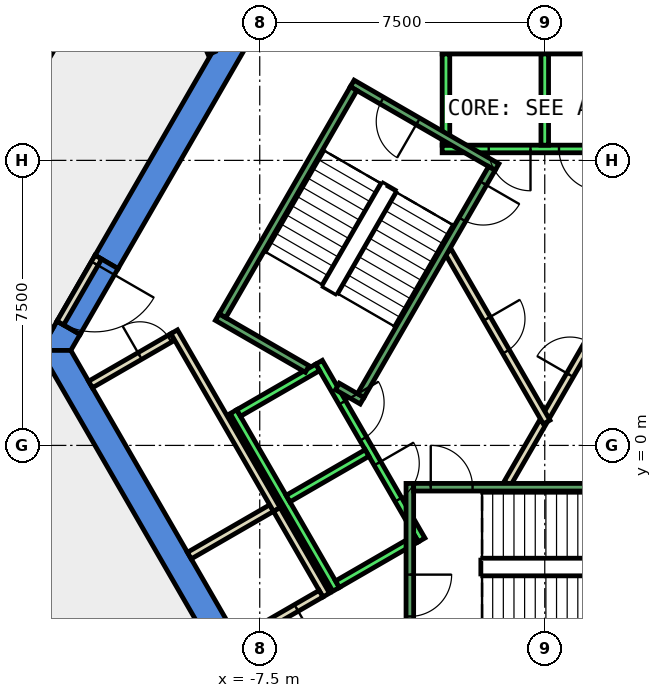
"""IFC4 building model, lengths in metres.
Left out: names, types, materials, properties, quantities, classifications, styles, units other than length and angle.
Written with IfcOpenShell. Run it as: python <this file> out.ifc"""

import sys

from ifc_helpers import new_model, si_unit, direction, frame, frame_2d, origin, place, context, subcontext, project, spatial, polyline, rectangle, outline, extrude, element, fill, save


model = new_model("IFC4")
c1 = context("Model", 3, precision=1e-05, world=origin(), true_north=direction((0.0, 1.0)))
c2 = subcontext(c1, "Body", "Model", "MODEL_VIEW")
j1 = project(units=[si_unit("LENGTHUNIT", "METRE"), si_unit("PLANEANGLEUNIT", "RADIAN")], contexts=[c1])
p1 = place(None, origin())
s1 = spatial("IfcSite", under=j1, at=p1, CompositionType="ELEMENT")
p2 = place(p1, origin())
s2 = spatial("IfcBuilding", under=s1, at=p2, CompositionType="ELEMENT")
p3 = place(p2, frame((0.0, 0.0, 215.0)))
s3 = spatial("IfcBuildingStorey", under=s2, at=p3, CompositionType="ELEMENT", Elevation=215.0)
p4 = place(p3, frame((0.0, 0.0, -0.4)))
e1 = element("IfcWall", 1, at=p4, inside=s3, PredefinedType="SHEAR", context=c2, shape_type="SweptSolid", body=[
    extrude(outline(polyline([(-11.834, 5.002), (-11.228, 4.652), (-6.235, 13.3), (-6.64, 14.0), (-11.834, 5.002)])), origin(), (0.0, 0.0, 1.0), 4.2),
])
p5 = place(p3, frame((0.0, 0.0, -0.4)))
e2 = element("IfcWall", 2, at=p5, inside=s3, PredefinedType="SHEAR", context=c2, shape_type="SweptSolid", body=[
    extrude(outline(polyline([(-12.228, 2.92), (-12.834, 3.27), (-13.279, 2.5), (-12.471, 2.5), (-12.228, 2.92)])), origin(), (0.0, 0.0, 1.0), 4.2),
])
p6 = place(p3, frame((0.0, 0.0, 3.6)))
e3 = element("IfcWall", 3, at=p6, inside=s3, PredefinedType="SHEAR", context=c2, shape_type="SweptSolid", body=[
    extrude(outline(polyline([(-12.834, 3.27), (-12.228, 2.92), (-11.228, 4.652), (-11.834, 5.002), (-12.834, 3.27)])), origin(), (0.0, 0.0, 1.0), 0.2),
])
p7 = place(p3, frame((0.0, 0.0, -0.4)))
e4 = element("IfcWall", 4, at=p7, inside=s3, PredefinedType="SHEAR", context=c2, shape_type="SweptSolid", body=[
    extrude(outline(polyline([(-13.279, 2.5), (-6.64, -9.0), (-6.235, -8.3), (-12.471, 2.5), (-13.279, 2.5)])), origin(), (0.0, 0.0, 1.0), 4.2),
])
p8 = place(p3, frame((-9.624, 12.265, 0.0), z_axis=(0.0, 0.0, 1.0), x_axis=(0.404081180606, -0.914723127225, 0.0)))
e5 = element("IfcWall", 5, at=p8, inside=s3, PredefinedType="PARTITIONING", context=c2, shape_type="SweptSolid", body=[
    extrude(rectangle(XDim=2.126, YDim=0.2, at=frame_2d((1.063, 0.0))), origin(), (0.0, 0.0, 1.0), 3.8),
])
p9 = place(p3, frame((-12.984, 3.01, 0.0), z_axis=(0.0, 0.0, 1.0), x_axis=(-0.866046247233, 0.49996389635, 0.0)))
e6 = element("IfcWall", 6, at=p9, inside=s3, PredefinedType="PARTITIONING", context=c2, shape_type="SweptSolid", body=[
    extrude(rectangle(XDim=0.35, YDim=0.2, at=frame_2d((0.175, 0.0))), origin(), (0.0, 0.0, 1.0), 2.4),
])
p10 = place(p3, frame((-14.236, 8.305, 0.0), z_axis=(0.0, 0.0, 1.0), x_axis=(0.500110539333, 0.865961574464, 0.0)))
e7 = element("IfcWall", 7, at=p10, inside=s3, PredefinedType="PARTITIONING", context=c2, shape_type="SweptSolid", body=[
    extrude(rectangle(XDim=3.993, YDim=0.2, at=frame_2d((1.997, 0.0))), origin(), (0.0, 0.0, 1.0), 3.8),
])
p11 = place(p3, frame((-7.188, -1.65, 0.0), z_axis=(0.0, 0.0, 1.0), x_axis=(-0.866022959057, -0.500004234368, 0.0)))
e8 = element("IfcWall", 8, at=p11, inside=s3, PredefinedType="PARTITIONING", context=c2, shape_type="SweptSolid", body=[
    extrude(rectangle(XDim=2.5, YDim=0.2, at=frame_2d((1.25, 0.0))), origin(), (0.0, 0.0, 1.0), 3.8),
])
p12 = place(p3, frame((-11.953, 1.603, 0.0), z_axis=(0.0, 0.0, 1.0), x_axis=(0.865998541277, 0.500046524342, 0.0)))
e9 = element("IfcWall", 9, at=p12, inside=s3, PredefinedType="PARTITIONING", context=c2, shape_type="SweptSolid", body=[
    extrude(rectangle(XDim=2.5, YDim=0.2, at=frame_2d((1.25, 0.0))), origin(), (0.0, 0.0, 1.0), 3.8),
])
p13 = place(p12, frame((1.5, 0.0, 0.0)))
e10 = element("IfcOpeningElement", 10, at=p13, cuts=e9, PredefinedType="OPENING", context=c2, shape_type="SweptSolid", body=[
    extrude(rectangle(XDim=0.9, YDim=2.1, at=frame_2d((0.45, 1.05))), frame((0.0, 0.11, 0.0), z_axis=(0.0, -1.0, 0.0), x_axis=(1.0, 0.0, 0.0)), (0.0, 0.0, 1.0), 0.22),
])
p14 = place(p3, frame((-9.751, 2.99, 0.0), z_axis=(0.0, 0.0, 1.0), x_axis=(0.499955951776, -0.866050833545, 0.0)))
e11 = element("IfcWall", 11, at=p14, inside=s3, PredefinedType="PARTITIONING", context=c2, shape_type="SweptSolid", body=[
    extrude(rectangle(XDim=5.4, YDim=0.2, at=frame_2d((2.7, 0.0))), origin(), (0.0, 0.0, 1.0), 3.8),
])
p15 = place(p3, frame((-7.051, -1.687, 0.0), z_axis=(0.0, 0.0, 1.0), x_axis=(0.500128937424, -0.865950948929, 0.0)))
e12 = element("IfcWall", 12, at=p15, inside=s3, PredefinedType="PARTITIONING", context=c2, shape_type="SweptSolid", body=[
    extrude(rectangle(XDim=2.599, YDim=0.2, at=frame_2d((1.3, 0.0))), origin(), (0.0, 0.0, 1.0), 3.8),
])
p16 = place(p3, frame((-5.888, -3.902, 0.0), z_axis=(0.0, 0.0, 1.0), x_axis=(-0.866022959057, -0.500004234368, 0.0)))
e13 = element("IfcWall", 13, at=p16, inside=s3, PredefinedType="PARTITIONING", context=c2, shape_type="SweptSolid", body=[
    extrude(rectangle(XDim=2.5, YDim=0.2, at=frame_2d((1.25, 0.0))), origin(), (0.0, 0.0, 1.0), 3.8),
])
p17 = place(p16, frame((0.75, 0.0, 0.0)))
e14 = element("IfcOpeningElement", 14, at=p17, cuts=e13, PredefinedType="OPENING", context=c2, shape_type="SweptSolid", body=[
    extrude(rectangle(XDim=0.9, YDim=2.1, at=frame_2d((0.45, 1.05))), frame((0.0, 0.11, 0.0), z_axis=(0.0, -1.0, 0.0), x_axis=(1.0, 0.0, 0.0)), (0.0, 0.0, 1.0), 0.22),
])
p18 = place(p3, frame((-0.982, -1.0, 0.0), z_axis=(0.0, 0.0, 1.0), x_axis=(0.50024047865, 0.865886518847, 0.0)))
e15 = element("IfcWall", 15, at=p18, inside=s3, PredefinedType="PARTITIONING", context=c2, shape_type="SweptSolid", body=[
    extrude(rectangle(XDim=1.863, YDim=0.2, at=frame_2d((0.931, 0.0))), origin(), (0.0, 0.0, 1.0), 3.8),
])
p19 = place(p3, frame((0.05, 0.787, 0.0), z_axis=(0.0, 0.0, 1.0), x_axis=(0.499954076797, 0.866051915934, 0.0)))
e16 = element("IfcWall", 16, at=p19, inside=s3, PredefinedType="PARTITIONING", context=c2, shape_type="SweptSolid", body=[
    extrude(rectangle(XDim=3.558, YDim=0.2, at=frame_2d((1.779, 0.0))), origin(), (0.0, 0.0, 1.0), 3.8),
])
p20 = place(p19, frame((1.229, 0.0, 0.0)))
e17 = element("IfcOpeningElement", 17, at=p20, cuts=e16, PredefinedType="OPENING", context=c2, shape_type="SweptSolid", body=[
    extrude(rectangle(XDim=1.0, YDim=2.1, at=frame_2d((0.5, 1.05))), frame((0.0, 0.11, 0.0), z_axis=(0.0, -1.0, 0.0), x_axis=(1.0, 0.0, 0.0)), (0.0, 0.0, 1.0), 0.22),
])
p21 = place(p3, frame((-2.54, 5.1, 0.0), z_axis=(0.0, 0.0, 1.0), x_axis=(0.499925051871, -0.866068670783, 0.0)))
e18 = element("IfcWall", 18, at=p21, inside=s3, PredefinedType="PARTITIONING", context=c2, shape_type="SweptSolid", body=[
    extrude(rectangle(XDim=5.181, YDim=0.2, at=frame_2d((2.59, 0.0))), origin(), (0.0, 0.0, 1.0), 3.8),
])
p22 = place(p21, frame((2.04, 0.0, 0.0)))
e19 = element("IfcOpeningElement", 19, at=p22, cuts=e18, PredefinedType="OPENING", context=c2, shape_type="SweptSolid", body=[
    extrude(rectangle(XDim=1.0, YDim=2.1, at=frame_2d((0.5, 1.05))), frame((0.0, 0.11, 0.0), z_axis=(0.0, -1.0, 0.0), x_axis=(1.0, 0.0, 0.0)), (0.0, 0.0, 1.0), 0.22),
])
p23 = place(p3, frame((-11.747, 4.952, 0.0), z_axis=(0.0, 0.0, 1.0), x_axis=(-0.50002537861, -0.866010750942, 0.0)))
e20 = element("IfcWall", 20, at=p23, inside=s3, PredefinedType="PARTITIONING", context=c2, shape_type="SweptSolid", body=[
    extrude(rectangle(XDim=2.0, YDim=0.2, at=frame_2d((1.0, 0.0))), origin(), (0.0, 0.0, 1.0), 2.4),
])
p24 = place(p23, frame((0.19, 0.0, 0.0)))
e21 = element("IfcOpeningElement", 21, at=p24, cuts=e20, PredefinedType="OPENING", context=c2, shape_type="SweptSolid", body=[
    extrude(rectangle(XDim=1.8, YDim=2.1, at=frame_2d((0.9, 1.05))), frame((0.0, 0.11, 0.0), z_axis=(0.0, -1.0, 0.0), x_axis=(1.0, 0.0, 0.0)), (0.0, 0.0, 1.0), 0.22),
])
p25 = place(p3, frame((2.7, 7.8, 0.0), z_axis=(0.0, 0.0, 1.0), x_axis=(-1.0, 0.0, 0.0)))
e22 = element("IfcWall", 22, at=p25, inside=s3, PredefinedType="STANDARD", context=c2, shape_type="SweptSolid", body=[
    extrude(rectangle(XDim=5.4, YDim=0.2, at=frame_2d((2.7, 0.0))), origin(), (0.0, 0.0, 1.0), 3.8),
])
p26 = place(p25, frame((1.225, 0.0, 0.0)))
e23 = element("IfcOpeningElement", 23, at=p26, cuts=e22, PredefinedType="OPENING", context=c2, shape_type="SweptSolid", body=[
    extrude(rectangle(XDim=1.1, YDim=2.1, at=frame_2d((0.55, 1.05))), frame((0.0, 0.11, 0.0), z_axis=(0.0, -1.0, 0.0), x_axis=(1.0, 0.0, 0.0)), (0.0, 0.0, 1.0), 0.22),
])
p27 = place(p25, frame((3.075, 0.0, 0.0)))
e24 = element("IfcOpeningElement", 24, at=p27, cuts=e22, PredefinedType="OPENING", context=c2, shape_type="SweptSolid", body=[
    extrude(rectangle(XDim=1.1, YDim=2.1, at=frame_2d((0.55, 1.05))), frame((0.0, 0.11, 0.0), z_axis=(0.0, -1.0, 0.0), x_axis=(1.0, 0.0, 0.0)), (0.0, 0.0, 1.0), 0.22),
])
p28 = place(p3, frame((2.7, 10.4, 0.0), z_axis=(0.0, 0.0, 1.0), x_axis=(-1.0, 0.0, 0.0)))
e25 = element("IfcWall", 25, at=p28, inside=s3, PredefinedType="STANDARD", context=c2, shape_type="SweptSolid", body=[
    extrude(rectangle(XDim=5.4, YDim=0.2, at=frame_2d((2.7, 0.0))), origin(), (0.0, 0.0, 1.0), 3.8),
])
for number, where, z_axis, x_axis in (
    (26, (0.0, 7.9, 0.0), (0.0, 0.0, 1.0), (0.0, 1.0, 0.0)),
    (27, (-2.6, 7.9, 0.0), (0.0, 0.0, 1.0), (0.0, 1.0, 0.0)),
):
    element("IfcWall", number, at=place(p3, frame(where, z_axis=z_axis, x_axis=x_axis)), inside=s3, PredefinedType="STANDARD", context=c2, shape_type="SweptSolid", body=[
        extrude(rectangle(XDim=2.4, YDim=0.2, at=frame_2d((1.2, 0.0))), origin(), (0.0, 0.0, 1.0), 3.8),
    ])
p29 = place(p3, frame((-5.94, 2.188, 0.0), z_axis=(0.0, 0.0, 1.0), x_axis=(0.500034260056, -0.866005622828, 0.0)))
e28 = element("IfcWall", 28, at=p29, inside=s3, PredefinedType="STANDARD", context=c2, shape_type="SweptSolid", body=[
    extrude(rectangle(XDim=5.399, YDim=0.2, at=frame_2d((2.7, 0.0))), origin(), (0.0, 0.0, 1.0), 3.8),
])
p30 = place(p29, frame((3.075, 0.0, 0.0)))
e29 = element("IfcOpeningElement", 29, at=p30, cuts=e28, PredefinedType="OPENING", context=c2, shape_type="SweptSolid", body=[
    extrude(rectangle(XDim=1.1, YDim=2.1, at=frame_2d((0.55, 1.05))), frame((0.0, 0.11, 0.0), z_axis=(0.0, -1.0, 0.0), x_axis=(1.0, 0.0, 0.0)), (0.0, 0.0, 1.0), 0.22),
])
p31 = place(p29, frame((1.225, 0.0, 0.0)))
e30 = element("IfcOpeningElement", 30, at=p31, cuts=e28, PredefinedType="OPENING", context=c2, shape_type="SweptSolid", body=[
    extrude(rectangle(XDim=1.1, YDim=2.1, at=frame_2d((0.55, 1.05))), frame((0.0, 0.11, 0.0), z_axis=(0.0, -1.0, 0.0), x_axis=(1.0, 0.0, 0.0)), (0.0, 0.0, 1.0), 0.22),
])
p32 = place(p3, frame((-8.192, 0.888, 0.0), z_axis=(0.0, 0.0, 1.0), x_axis=(0.500034260056, -0.866005622828, 0.0)))
e31 = element("IfcWall", 31, at=p32, inside=s3, PredefinedType="STANDARD", context=c2, shape_type="SweptSolid", body=[
    extrude(rectangle(XDim=5.399, YDim=0.2, at=frame_2d((2.7, 0.0))), origin(), (0.0, 0.0, 1.0), 3.8),
])
for number, where, z_axis, x_axis in (
    (32, (-5.977, 2.052, 0.0), (0.0, 0.0, 1.0), (-0.866, -0.5, 0.0)),
    (33, (-4.677, -0.2, 0.0), (0.0, 0.0, 1.0), (-0.866, -0.5, 0.0)),
):
    element("IfcWall", number, at=place(p3, frame(where, z_axis=z_axis, x_axis=x_axis)), inside=s3, PredefinedType="STANDARD", context=c2, shape_type="SweptSolid", body=[
        extrude(rectangle(XDim=2.399, YDim=0.2, at=frame_2d((1.2, 0.0))), origin(), (0.0, 0.0, 1.0), 3.8),
    ])
p33 = place(p3, frame((-3.377, -2.452, 0.0), z_axis=(0.0, 0.0, 1.0), x_axis=(-0.865955154139, -0.50012165622, 0.0)))
e34 = element("IfcWall", 34, at=p33, inside=s3, PredefinedType="STANDARD", context=c2, shape_type="SweptSolid", body=[
    extrude(rectangle(XDim=2.4, YDim=0.2, at=frame_2d((1.2, 0.0))), origin(), (0.0, 0.0, 1.0), 3.8),
])
p34 = place(p3, frame((-3.55, -1.0, 0.0), z_axis=(0.0, 0.0, 1.0), x_axis=(0.0, -1.0, 0.0)))
e35 = element("IfcWall", 35, at=p34, inside=s3, PredefinedType="STANDARD", context=c2, shape_type="SweptSolid", body=[
    extrude(rectangle(XDim=4.4, YDim=0.2, at=frame_2d((2.2, 0.0))), origin(), (0.0, 0.0, 1.0), 3.8),
])
p35 = place(p34, frame((2.4, 0.0, 0.0)))
e36 = element("IfcOpeningElement", 36, at=p35, cuts=e35, PredefinedType="OPENING", context=c2, shape_type="SweptSolid", body=[
    extrude(rectangle(XDim=1.1, YDim=2.2, at=frame_2d((0.55, 1.1))), frame((0.0, 0.11, 0.0), z_axis=(0.0, -1.0, 0.0), x_axis=(1.0, 0.0, 0.0)), (0.0, 0.0, 1.0), 0.22),
])
p36 = place(p3, frame((-3.45, -1.1, 0.0), z_axis=(0.0, 0.0, 1.0), x_axis=(1.0, 0.0, 0.0)))
e37 = element("IfcWall", 37, at=p36, inside=s3, PredefinedType="STANDARD", context=c2, shape_type="SweptSolid", body=[
    extrude(rectangle(XDim=6.9, YDim=0.2, at=frame_2d((3.45, 0.0))), origin(), (0.0, 0.0, 1.0), 3.8),
])
p37 = place(p36, frame((0.45, 0.0, 0.0)))
e38 = element("IfcOpeningElement", 38, at=p37, cuts=e37, PredefinedType="OPENING", context=c2, shape_type="SweptSolid", body=[
    extrude(rectangle(XDim=1.1, YDim=2.2, at=frame_2d((0.55, 1.1))), frame((0.0, 0.11, 0.0), z_axis=(0.0, -1.0, 0.0), x_axis=(1.0, 0.0, 0.0)), (0.0, 0.0, 1.0), 0.22),
])
p38 = place(p3, frame((-1.256, 7.324, 0.0), z_axis=(0.0, 0.0, 1.0), x_axis=(-0.866046073146, 0.499964197906, 0.0)))
e39 = element("IfcWall", 39, at=p38, inside=s3, PredefinedType="STANDARD", context=c2, shape_type="SweptSolid", body=[
    extrude(rectangle(XDim=4.4, YDim=0.2, at=frame_2d((2.2, 0.0))), origin(), (0.0, 0.0, 1.0), 3.8),
])
p39 = place(p38, frame((2.4, 0.0, 0.0)))
e40 = element("IfcOpeningElement", 40, at=p39, cuts=e39, PredefinedType="OPENING", context=c2, shape_type="SweptSolid", body=[
    extrude(rectangle(XDim=1.1, YDim=2.2, at=frame_2d((0.55, 1.1))), frame((0.0, 0.11, 0.0), z_axis=(0.0, -1.0, 0.0), x_axis=(1.0, 0.0, 0.0)), (0.0, 0.0, 1.0), 0.22),
])
p40 = place(p3, frame((-6.25, 2.01, 0.0), z_axis=(0.0, 0.0, 1.0), x_axis=(-0.86611865017, 0.499838457731, 0.0)))
e41 = element("IfcWall", 41, at=p40, inside=s3, PredefinedType="STANDARD", context=c2, shape_type="SweptSolid", body=[
    extrude(rectangle(XDim=2.733, YDim=0.2, at=frame_2d((1.366, 0.0))), origin(), (0.0, 0.0, 1.0), 3.8),
])
p41 = place(p3, frame((-4.806, 1.176, 0.0), z_axis=(0.0, 0.0, 1.0), x_axis=(-0.866558586415, 0.499075361355, 0.0)))
e42 = element("IfcWall", 42, at=p41, inside=s3, PredefinedType="STANDARD", context=c2, shape_type="SweptSolid", body=[
    extrude(rectangle(XDim=0.751, YDim=0.2, at=frame_2d((0.376, 0.0))), origin(), (0.0, 0.0, 1.0), 3.8),
])
p42 = place(p3, frame((-1.393, 7.288, 0.0), z_axis=(0.0, 0.0, 1.0), x_axis=(-0.499963383562, -0.866046543262, 0.0)))
e43 = element("IfcWall", 43, at=p42, inside=s3, PredefinedType="STANDARD", context=c2, shape_type="SweptSolid", body=[
    extrude(rectangle(XDim=6.9, YDim=0.2, at=frame_2d((3.45, 0.0))), origin(), (0.0, 0.0, 1.0), 3.8),
])
p43 = place(p42, frame((0.45, 0.0, 0.0)))
e44 = element("IfcOpeningElement", 44, at=p43, cuts=e43, PredefinedType="OPENING", context=c2, shape_type="SweptSolid", body=[
    extrude(rectangle(XDim=1.1, YDim=2.2, at=frame_2d((0.55, 1.1))), frame((0.0, 0.11, 0.0), z_axis=(0.0, -1.0, 0.0), x_axis=(1.0, 0.0, 0.0)), (0.0, 0.0, 1.0), 0.22),
])
p44 = place(p3, frame((-5.03, 9.388, 0.0), z_axis=(0.0, 0.0, 1.0), x_axis=(-0.499978703459, -0.866037698999, 0.0)))
e45 = element("IfcWall", 45, at=p44, inside=s3, PredefinedType="STANDARD", context=c2, shape_type="SweptSolid", body=[
    extrude(rectangle(XDim=6.9, YDim=0.2, at=frame_2d((3.45, 0.0))), origin(), (0.0, 0.0, 1.0), 3.8),
])
p45 = place(p20, origin())
e46 = element("IfcDoor", 46, at=p45, inside=s3, OperationType="SINGLE_SWING_RIGHT", PredefinedType="DOOR", context=c2, shape_type="SweptSolid", body=[
    extrude(rectangle(XDim=1.0, YDim=2.1, at=frame_2d((0.5, 1.05))), frame((0.0, 0.025, 0.0), z_axis=(0.0, -1.0, 0.0), x_axis=(1.0, 0.0, 0.0)), (0.0, 0.0, 1.0), 0.05),
])
fill(e17, e46)
p46 = place(p22, origin())
e47 = element("IfcDoor", 47, at=p46, inside=s3, OperationType="SINGLE_SWING_RIGHT", PredefinedType="DOOR", context=c2, shape_type="SweptSolid", body=[
    extrude(rectangle(XDim=1.0, YDim=2.1, at=frame_2d((0.5, 1.05))), frame((0.0, 0.025, 0.0), z_axis=(0.0, -1.0, 0.0), x_axis=(1.0, 0.0, 0.0)), (0.0, 0.0, 1.0), 0.05),
])
fill(e19, e47)
p47 = place(p13, origin())
e48 = element("IfcDoor", 48, at=p47, inside=s3, OperationType="SINGLE_SWING_LEFT", PredefinedType="DOOR", context=c2, shape_type="SweptSolid", body=[
    extrude(rectangle(XDim=0.9, YDim=2.1, at=frame_2d((0.45, 1.05))), frame((0.0, 0.025, 0.0), z_axis=(0.0, -1.0, 0.0), x_axis=(1.0, 0.0, 0.0)), (0.0, 0.0, 1.0), 0.05),
])
fill(e10, e48)
p48 = place(p17, origin())
e49 = element("IfcDoor", 49, at=p48, inside=s3, OperationType="SINGLE_SWING_RIGHT", PredefinedType="DOOR", context=c2, shape_type="SweptSolid", body=[
    extrude(rectangle(XDim=0.9, YDim=2.1, at=frame_2d((0.45, 1.05))), frame((0.0, 0.025, 0.0), z_axis=(0.0, -1.0, 0.0), x_axis=(1.0, 0.0, 0.0)), (0.0, 0.0, 1.0), 0.05),
])
fill(e14, e49)
p49 = place(p24, origin())
e50 = element("IfcDoor", 50, at=p49, inside=s3, OperationType="DOUBLE_DOOR_SINGLE_SWING", PredefinedType="DOOR", context=c2, shape_type="SweptSolid", body=[
    extrude(rectangle(XDim=1.8, YDim=2.1, at=frame_2d((0.9, 1.05))), frame((0.0, 0.025, 0.0), z_axis=(0.0, -1.0, 0.0), x_axis=(1.0, 0.0, 0.0)), (0.0, 0.0, 1.0), 0.05),
])
fill(e21, e50)
p50 = place(p26, origin())
e51 = element("IfcDoor", 51, at=p50, inside=s3, OperationType="SLIDING_TO_LEFT", PredefinedType="DOOR", context=c2, shape_type="SweptSolid", body=[
    extrude(rectangle(XDim=1.1, YDim=2.1, at=frame_2d((0.55, 1.05))), frame((0.0, 0.025, 0.0), z_axis=(0.0, -1.0, 0.0), x_axis=(1.0, 0.0, 0.0)), (0.0, 0.0, 1.0), 0.05),
])
fill(e23, e51)
p51 = place(p27, origin())
e52 = element("IfcDoor", 52, at=p51, inside=s3, OperationType="SLIDING_TO_LEFT", PredefinedType="DOOR", context=c2, shape_type="SweptSolid", body=[
    extrude(rectangle(XDim=1.1, YDim=2.1, at=frame_2d((0.55, 1.05))), frame((0.0, 0.025, 0.0), z_axis=(0.0, -1.0, 0.0), x_axis=(1.0, 0.0, 0.0)), (0.0, 0.0, 1.0), 0.05),
])
fill(e24, e52)
p52 = place(p30, origin())
e53 = element("IfcDoor", 53, at=p52, inside=s3, OperationType="SLIDING_TO_LEFT", PredefinedType="DOOR", context=c2, shape_type="SweptSolid", body=[
    extrude(rectangle(XDim=1.1, YDim=2.1, at=frame_2d((0.55, 1.05))), frame((0.0, 0.025, 0.0), z_axis=(0.0, -1.0, 0.0), x_axis=(1.0, 0.0, 0.0)), (0.0, 0.0, 1.0), 0.05),
])
fill(e29, e53)
p53 = place(p31, origin())
e54 = element("IfcDoor", 54, at=p53, inside=s3, OperationType="SLIDING_TO_LEFT", PredefinedType="DOOR", context=c2, shape_type="SweptSolid", body=[
    extrude(rectangle(XDim=1.1, YDim=2.1, at=frame_2d((0.55, 1.05))), frame((0.0, 0.025, 0.0), z_axis=(0.0, -1.0, 0.0), x_axis=(1.0, 0.0, 0.0)), (0.0, 0.0, 1.0), 0.05),
])
fill(e30, e54)
p54 = place(p37, origin())
e55 = element("IfcDoor", 55, at=p54, inside=s3, OperationType="SINGLE_SWING_LEFT", PredefinedType="DOOR", context=c2, shape_type="SweptSolid", body=[
    extrude(rectangle(XDim=1.1, YDim=2.2, at=frame_2d((0.55, 1.1))), frame((0.0, 0.025, 0.0), z_axis=(0.0, -1.0, 0.0), x_axis=(1.0, 0.0, 0.0)), (0.0, 0.0, 1.0), 0.05),
])
fill(e38, e55)
p55 = place(p35, origin())
e56 = element("IfcDoor", 56, at=p55, inside=s3, OperationType="SINGLE_SWING_LEFT", PredefinedType="DOOR", context=c2, shape_type="SweptSolid", body=[
    extrude(rectangle(XDim=1.1, YDim=2.2, at=frame_2d((0.55, 1.1))), frame((0.0, 0.025, 0.0), z_axis=(0.0, -1.0, 0.0), x_axis=(1.0, 0.0, 0.0)), (0.0, 0.0, 1.0), 0.05),
])
fill(e36, e56)
p56 = place(p43, origin())
e57 = element("IfcDoor", 57, at=p56, inside=s3, OperationType="SINGLE_SWING_LEFT", PredefinedType="DOOR", context=c2, shape_type="SweptSolid", body=[
    extrude(rectangle(XDim=1.1, YDim=2.2, at=frame_2d((0.55, 1.1))), frame((0.0, 0.025, 0.0), z_axis=(0.0, -1.0, 0.0), x_axis=(1.0, 0.0, 0.0)), (0.0, 0.0, 1.0), 0.05),
])
fill(e44, e57)
p57 = place(p39, origin())
e58 = element("IfcDoor", 58, at=p57, inside=s3, OperationType="SINGLE_SWING_LEFT", PredefinedType="DOOR", context=c2, shape_type="SweptSolid", body=[
    extrude(rectangle(XDim=1.1, YDim=2.2, at=frame_2d((0.55, 1.1))), frame((0.0, 0.025, 0.0), z_axis=(0.0, -1.0, 0.0), x_axis=(1.0, 0.0, 0.0)), (0.0, 0.0, 1.0), 0.05),
])
fill(e40, e58)
save(model, sys.argv[1])
